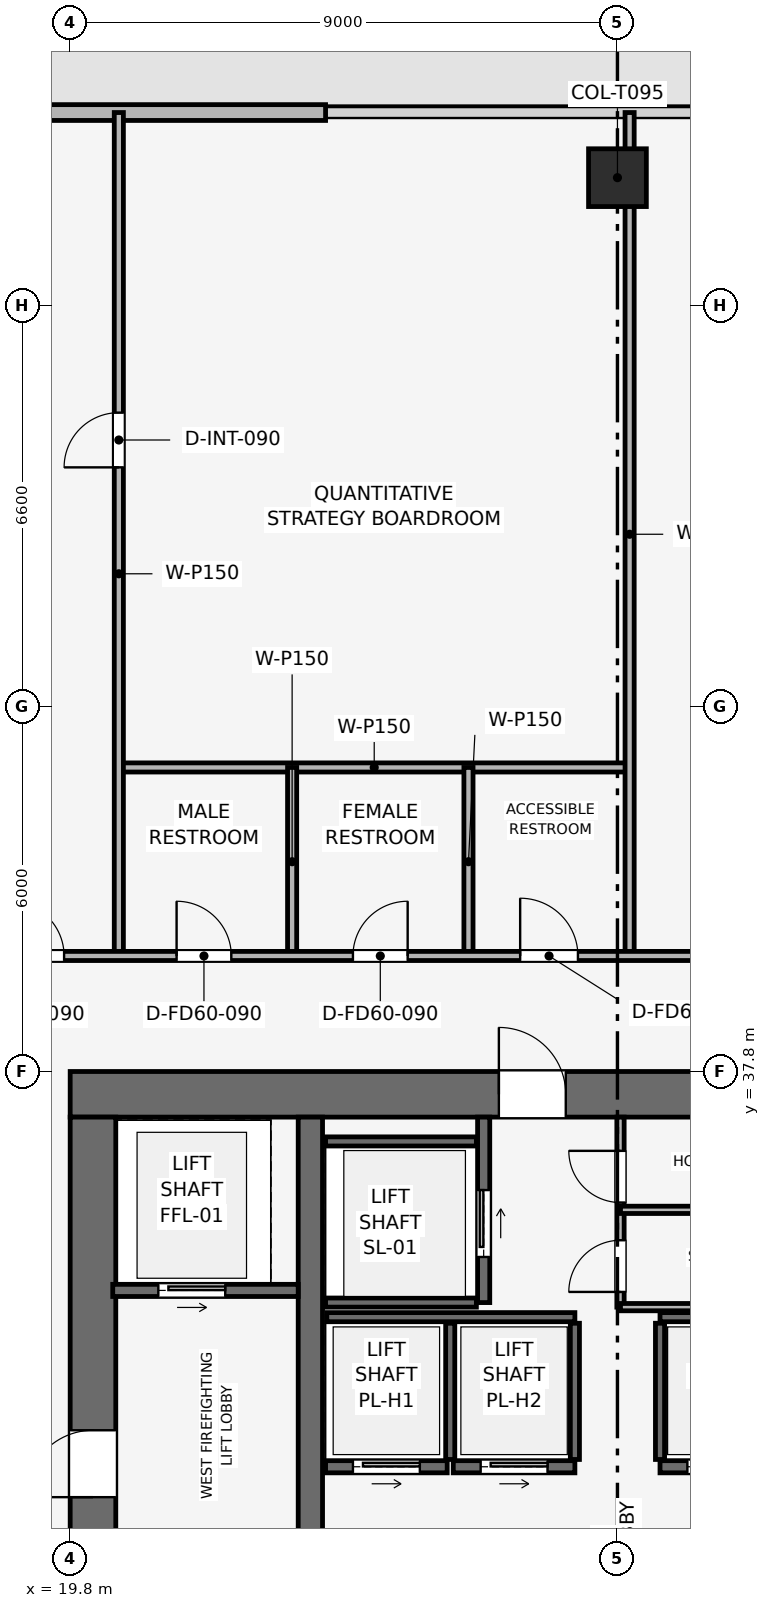
"""IFC4 building model, lengths in metres.
Left out: names, types, materials, properties, quantities, classifications, styles, units other than length and angle.
Written with IfcOpenShell. Run it as: python <this file> out.ifc"""

import sys

from ifc_helpers import new_model, si_unit, direction, frame, frame_2d, origin, origin_2d, place, context, subcontext, project, spatial, rectangle, extrude, element, fill, save


model = new_model("IFC4")
c1 = context("Model", 3, precision=1e-05, world=origin(), true_north=direction((0.0, 1.0)))
c2 = subcontext(c1, "Body", "Model", "MODEL_VIEW")
j1 = project(units=[si_unit("LENGTHUNIT", "METRE"), si_unit("PLANEANGLEUNIT", "RADIAN")], contexts=[c1])
p1 = place(None, origin())
s1 = spatial("IfcSite", under=j1, at=p1, CompositionType="ELEMENT")
p2 = place(p1, origin())
s2 = spatial("IfcBuilding", under=s1, at=p2, CompositionType="ELEMENT")
p3 = place(p2, frame((0.0, 0.0, 280.35)))
s3 = spatial("IfcBuildingStorey", under=s2, at=p3, CompositionType="ELEMENT", Elevation=280.35)
p4 = place(p3, frame((19.8, 37.425, 0.0), z_axis=(0.0, 0.0, 1.0), x_axis=(1.0, 0.0, 0.0)))
e1 = element("IfcWall", 1, at=p4, inside=s3, PredefinedType="SHEAR", context=c2, shape_type="SweptSolid", body=[
    extrude(rectangle(XDim=18.0, YDim=0.75, at=frame_2d((9.0, 0.0))), origin(), (0.0, 0.0, 1.0), 3.75),
])
p5 = place(p4, frame((7.05, 0.0, 0.0)))
e2 = element("IfcOpeningElement", 2, at=p5, cuts=e1, PredefinedType="OPENING", context=c2, shape_type="SweptSolid", body=[
    extrude(rectangle(XDim=1.1, YDim=2.15, at=frame_2d((0.55, 1.075))), frame((0.0, 0.385, 0.0), z_axis=(0.0, -1.0, 0.0), x_axis=(1.0, 0.0, 0.0)), (0.0, 0.0, 1.0), 0.77),
])
p6 = place(p3, frame((20.175, 20.55, 0.0), z_axis=(0.0, 0.0, 1.0), x_axis=(0.0, 1.0, 0.0)))
e3 = element("IfcWall", 3, at=p6, inside=s3, PredefinedType="SHEAR", context=c2, shape_type="SweptSolid", body=[
    extrude(rectangle(XDim=16.5, YDim=0.75, at=frame_2d((8.25, 0.0))), origin(), (0.0, 0.0, 1.0), 3.75),
])
p7 = place(p6, frame((10.25, 0.0, 0.0)))
e4 = element("IfcOpeningElement", 4, at=p7, cuts=e3, PredefinedType="OPENING", context=c2, shape_type="SweptSolid", body=[
    extrude(rectangle(XDim=1.1, YDim=2.15, at=frame_2d((0.55, 1.075))), frame((0.0, 0.385, 0.0), z_axis=(0.0, -1.0, 0.0), x_axis=(1.0, 0.0, 0.0)), (0.0, 0.0, 1.0), 0.77),
])
p8 = place(p3, frame((23.75, 20.55, 0.0), z_axis=(0.0, 0.0, 1.0), x_axis=(0.0, 1.0, 0.0)))
e5 = element("IfcWall", 5, at=p8, inside=s3, PredefinedType="SHEAR", context=c2, shape_type="SweptSolid", body=[
    extrude(rectangle(XDim=16.5, YDim=0.4, at=frame_2d((8.25, 0.0))), origin(), (0.0, 0.0, 1.0), 3.75),
])
p9 = place(p3, frame((28.8, 52.499, 0.003), z_axis=(0.0, -0.23333049931, 0.97239748976), x_axis=(1.0, 0.0, 0.0)))
e6 = element("IfcColumn", 6, at=p9, inside=s3, PredefinedType="COLUMN", context=c2, shape_type="SweptSolid", body=[
    extrude(rectangle(XDim=0.95, YDim=0.95, at=origin_2d()), origin(), (0.0, 0.0, 1.0), 3.48),
])
p10 = place(p3, frame((10.8, 53.57, 0.0), z_axis=(0.0, 0.0, 1.0), x_axis=(1.0, 0.0, 0.0)))
e7 = element("IfcWall", 7, at=p10, inside=s3, PredefinedType="SOLIDWALL", context=c2, shape_type="SweptSolid", body=[
    extrude(rectangle(XDim=13.2, YDim=0.26, at=frame_2d((6.6, 0.0))), origin(), (0.0, 0.0, 1.0), 3.39),
])
p11 = place(p10, frame((6.516, 0.0, 0.0)))
e8 = element("IfcOpeningElement", 8, at=p11, cuts=e7, PredefinedType="OPENING", context=c2, shape_type="SweptSolid", body=[
    extrude(rectangle(XDim=1.0, YDim=2.2, at=frame_2d((0.5, 1.1))), frame((0.0, 0.14, 0.0), z_axis=(0.0, -1.0, 0.0), x_axis=(1.0, 0.0, 0.0)), (0.0, 0.0, 1.0), 0.28),
])
p12 = place(p3, frame((20.5, 34.2, 0.0), z_axis=(0.0, 0.0, 1.0), x_axis=(1.0, 0.0, 0.0)))
e9 = element("IfcWall", 9, at=p12, inside=s3, PredefinedType="SHEAR", context=c2, shape_type="SweptSolid", body=[
    extrude(rectangle(XDim=3.05, YDim=0.2, at=frame_2d((1.525, 0.0))), origin(), (0.0, 0.0, 1.0), 3.39),
])
p13 = place(p12, frame((0.75, 0.0, 0.0)))
e10 = element("IfcOpeningElement", 10, at=p13, cuts=e9, PredefinedType="OPENING", context=c2, shape_type="SweptSolid", body=[
    extrude(rectangle(XDim=1.1, YDim=2.15, at=frame_2d((0.55, 1.075))), frame((0.0, 0.11, 0.0), z_axis=(0.0, -1.0, 0.0), x_axis=(1.0, 0.0, 0.0)), (0.0, 0.0, 1.0), 0.22),
])
p14 = place(p3, frame((26.6, 34.0, 0.0), z_axis=(0.0, 0.0, 1.0), x_axis=(0.0, 1.0, 0.0)))
e11 = element("IfcWall", 11, at=p14, inside=s3, PredefinedType="SHEAR", context=c2, shape_type="SweptSolid", body=[
    extrude(rectangle(XDim=3.05, YDim=0.2, at=frame_2d((1.525, 0.0))), origin(), (0.0, 0.0, 1.0), 3.39),
])
p15 = place(p14, frame((0.75, 0.0, 0.0)))
e12 = element("IfcOpeningElement", 12, at=p15, cuts=e11, PredefinedType="OPENING", context=c2, shape_type="SweptSolid", body=[
    extrude(rectangle(XDim=1.1, YDim=2.15, at=frame_2d((0.55, 1.075))), frame((0.0, 0.11, 0.0), z_axis=(0.0, -1.0, 0.0), x_axis=(1.0, 0.0, 0.0)), (0.0, 0.0, 1.0), 0.22),
])
for number, where, z_axis, x_axis in (
    (13, (24.0, 34.0, 0.0), (0.0, 0.0, 1.0), (1.0, 0.0, 0.0)),
    (14, (24.0, 36.65, 0.0), (0.0, 0.0, 1.0), (1.0, 0.0, 0.0)),
):
    element("IfcWall", number, at=place(p3, frame(where, z_axis=z_axis, x_axis=x_axis)), inside=s3, PredefinedType="SHEAR", context=c2, shape_type="SweptSolid", body=[
        extrude(rectangle(XDim=2.48, YDim=0.15, at=frame_2d((1.24, 0.0))), origin(), (0.0, 0.0, 1.0), 3.39),
    ])
p16 = place(p3, frame((24.0, 31.3, 0.0), z_axis=(0.0, 0.0, 1.0), x_axis=(1.0, 0.0, 0.0)))
e15 = element("IfcWall", 15, at=p16, inside=s3, PredefinedType="SHEAR", context=c2, shape_type="SweptSolid", body=[
    extrude(rectangle(XDim=2.0, YDim=0.2, at=frame_2d((1.0, 0.0))), origin(), (0.0, 0.0, 1.0), 3.39),
])
p17 = place(p16, frame((0.45, 0.0, 0.0)))
e16 = element("IfcOpeningElement", 16, at=p17, cuts=e15, PredefinedType="OPENING", context=c2, shape_type="SweptSolid", body=[
    extrude(rectangle(XDim=1.1, YDim=2.15, at=frame_2d((0.55, 1.075))), frame((0.0, 0.11, 0.0), z_axis=(0.0, -1.0, 0.0), x_axis=(1.0, 0.0, 0.0)), (0.0, 0.0, 1.0), 0.22),
])
p18 = place(p3, frame((26.1, 31.3, 0.0), z_axis=(0.0, 0.0, 1.0), x_axis=(1.0, 0.0, 0.0)))
e17 = element("IfcWall", 17, at=p18, inside=s3, PredefinedType="SHEAR", context=c2, shape_type="SweptSolid", body=[
    extrude(rectangle(XDim=2.0, YDim=0.2, at=frame_2d((1.0, 0.0))), origin(), (0.0, 0.0, 1.0), 3.39),
])
p19 = place(p18, frame((0.45, 0.0, 0.0)))
e18 = element("IfcOpeningElement", 18, at=p19, cuts=e17, PredefinedType="OPENING", context=c2, shape_type="SweptSolid", body=[
    extrude(rectangle(XDim=1.1, YDim=2.15, at=frame_2d((0.55, 1.075))), frame((0.0, 0.11, 0.0), z_axis=(0.0, -1.0, 0.0), x_axis=(1.0, 0.0, 0.0)), (0.0, 0.0, 1.0), 0.22),
])
p20 = place(p3, frame((29.5, 31.3, 0.0), z_axis=(0.0, 0.0, 1.0), x_axis=(1.0, 0.0, 0.0)))
e19 = element("IfcWall", 19, at=p20, inside=s3, PredefinedType="SHEAR", context=c2, shape_type="SweptSolid", body=[
    extrude(rectangle(XDim=2.0, YDim=0.2, at=frame_2d((1.0, 0.0))), origin(), (0.0, 0.0, 1.0), 3.39),
])
p21 = place(p20, frame((0.45, 0.0, 0.0)))
e20 = element("IfcOpeningElement", 20, at=p21, cuts=e19, PredefinedType="OPENING", context=c2, shape_type="SweptSolid", body=[
    extrude(rectangle(XDim=1.1, YDim=2.15, at=frame_2d((0.55, 1.075))), frame((0.0, 0.11, 0.0), z_axis=(0.0, -1.0, 0.0), x_axis=(1.0, 0.0, 0.0)), (0.0, 0.0, 1.0), 0.22),
])
for number, where, z_axis, x_axis in (
    (21, (24.02, 33.76, 0.0), (0.0, 0.0, 1.0), (1.0, 0.0, 0.0)),
    (22, (29.5, 33.76, 0.0), (0.0, 0.0, 1.0), (1.0, 0.0, 0.0)),
):
    element("IfcWall", number, at=place(p3, frame(where, z_axis=z_axis, x_axis=x_axis)), inside=s3, PredefinedType="SHEAR", context=c2, shape_type="SweptSolid", body=[
        extrude(rectangle(XDim=4.08, YDim=0.15, at=frame_2d((2.04, 0.0))), origin(), (0.0, 0.0, 1.0), 3.39),
    ])
for number, where, z_axis, x_axis in (
    (23, (26.05, 31.42, 0.0), (0.0, 0.0, 1.0), (0.0, 1.0, 0.0)),
    (24, (28.1, 31.42, 0.0), (0.0, 0.0, 1.0), (0.0, 1.0, 0.0)),
    (25, (29.5, 31.42, 0.0), (0.0, 0.0, 1.0), (0.0, 1.0, 0.0)),
):
    element("IfcWall", number, at=place(p3, frame(where, z_axis=z_axis, x_axis=x_axis)), inside=s3, PredefinedType="SHEAR", context=c2, shape_type="SweptSolid", body=[
        extrude(rectangle(XDim=2.24, YDim=0.15, at=frame_2d((1.12, 0.0))), origin(), (0.0, 0.0, 1.0), 3.39),
    ])
p22 = place(p3, frame((28.85, 33.925, 0.0), z_axis=(0.0, 0.0, 1.0), x_axis=(0.0, 1.0, 0.0)))
e26 = element("IfcWall", 26, at=p22, inside=s3, PredefinedType="PARTITIONING", context=c2, shape_type="SweptSolid", body=[
    extrude(rectangle(XDim=3.125, YDim=0.12, at=frame_2d((1.562, 0.0))), origin(), (0.0, 0.0, 1.0), 3.39),
])
p23 = place(p22, frame((0.25, 0.0, 0.0)))
e27 = element("IfcOpeningElement", 27, at=p23, cuts=e26, PredefinedType="OPENING", context=c2, shape_type="SweptSolid", body=[
    extrude(rectangle(XDim=0.85, YDim=2.1, at=frame_2d((0.425, 1.05))), frame((0.0, 0.07, 0.0), z_axis=(0.0, -1.0, 0.0), x_axis=(1.0, 0.0, 0.0)), (0.0, 0.0, 1.0), 0.14),
])
p24 = place(p22, frame((1.72, 0.0, 0.0)))
e28 = element("IfcOpeningElement", 28, at=p24, cuts=e26, PredefinedType="OPENING", context=c2, shape_type="SweptSolid", body=[
    extrude(rectangle(XDim=0.85, YDim=2.1, at=frame_2d((0.425, 1.05))), frame((0.0, 0.07, 0.0), z_axis=(0.0, -1.0, 0.0), x_axis=(1.0, 0.0, 0.0)), (0.0, 0.0, 1.0), 0.14),
])
for number, where, z_axis, x_axis in (
    (29, (28.85, 35.525, 0.0), (0.0, 0.0, 1.0), (1.0, 0.0, 0.0)),
    (30, (28.85, 33.925, 0.0), (0.0, 0.0, 1.0), (1.0, 0.0, 0.0)),
):
    element("IfcWall", number, at=place(p3, frame(where, z_axis=z_axis, x_axis=x_axis)), inside=s3, PredefinedType="PARTITIONING", context=c2, shape_type="SweptSolid", body=[
        extrude(rectangle(XDim=3.3, YDim=0.12, at=frame_2d((1.65, 0.0))), origin(), (0.0, 0.0, 1.0), 3.39),
    ])
p25 = place(p3, frame((20.6, 42.8, 0.0), z_axis=(0.0, 0.0, 1.0), x_axis=(1.0, 0.0, 0.0)))
e31 = element("IfcWall", 31, at=p25, inside=s3, PredefinedType="PARTITIONING", context=c2, shape_type="SweptSolid", body=[
    extrude(rectangle(XDim=8.4, YDim=0.15, at=frame_2d((4.2, 0.0))), origin(), (0.0, 0.0, 1.0), 2.975),
])
p26 = place(p3, frame((20.6, 39.7, 0.0), z_axis=(0.0, 0.0, 1.0), x_axis=(0.0, 1.0, 0.0)))
e32 = element("IfcWall", 32, at=p26, inside=s3, PredefinedType="PARTITIONING", context=c2, shape_type="SweptSolid", body=[
    extrude(rectangle(XDim=13.87, YDim=0.15, at=frame_2d((6.935, 0.0))), origin(), (0.0, 0.0, 1.0), 2.975),
])
p27 = place(p26, frame((8.035, 0.0, 0.0)))
e33 = element("IfcOpeningElement", 33, at=p27, cuts=e32, PredefinedType="OPENING", context=c2, shape_type="SweptSolid", body=[
    extrude(rectangle(XDim=0.9, YDim=2.1, at=frame_2d((0.45, 1.05))), frame((0.0, 0.085, 0.0), z_axis=(0.0, -1.0, 0.0), x_axis=(1.0, 0.0, 0.0)), (0.0, 0.0, 1.0), 0.17),
])
p28 = place(p3, frame((29.0, 39.7, 0.0), z_axis=(0.0, 0.0, 1.0), x_axis=(0.0, 1.0, 0.0)))
e34 = element("IfcWall", 34, at=p28, inside=s3, PredefinedType="PARTITIONING", context=c2, shape_type="SweptSolid", body=[
    extrude(rectangle(XDim=13.87, YDim=0.15, at=frame_2d((6.935, 0.0))), origin(), (0.0, 0.0, 1.0), 2.975),
])
for number, where, z_axis, x_axis in (
    (35, (23.45, 39.7, 0.0), (0.0, 0.0, 1.0), (0.0, 1.0, 0.0)),
    (36, (26.35, 39.7, 0.0), (0.0, 0.0, 1.0), (0.0, 1.0, 0.0)),
):
    element("IfcWall", number, at=place(p3, frame(where, z_axis=z_axis, x_axis=x_axis)), inside=s3, PredefinedType="PARTITIONING", context=c2, shape_type="SweptSolid", body=[
        extrude(rectangle(XDim=3.1, YDim=0.15, at=frame_2d((1.55, 0.0))), origin(), (0.0, 0.0, 1.0), 3.015),
    ])
p29 = place(p3, frame((17.9, 39.7, 0.0), z_axis=(0.0, 0.0, 1.0), x_axis=(1.0, 0.0, 0.0)))
e37 = element("IfcWall", 37, at=p29, inside=s3, PredefinedType="PARTITIONING", context=c2, shape_type="SweptSolid", body=[
    extrude(rectangle(XDim=21.8, YDim=0.15, at=frame_2d((10.9, 0.0))), origin(), (0.0, 0.0, 1.0), 2.975),
])
p30 = place(p29, frame((0.9, 0.0, 0.0)))
e38 = element("IfcOpeningElement", 38, at=p30, cuts=e37, PredefinedType="OPENING", context=c2, shape_type="SweptSolid", body=[
    extrude(rectangle(XDim=0.9, YDim=2.1, at=frame_2d((0.45, 1.05))), frame((0.0, 0.085, 0.0), z_axis=(0.0, -1.0, 0.0), x_axis=(1.0, 0.0, 0.0)), (0.0, 0.0, 1.0), 0.17),
])
p31 = place(p29, frame((3.65, 0.0, 0.0)))
e39 = element("IfcOpeningElement", 39, at=p31, cuts=e37, PredefinedType="OPENING", context=c2, shape_type="SweptSolid", body=[
    extrude(rectangle(XDim=0.9, YDim=2.1, at=frame_2d((0.45, 1.05))), frame((0.0, 0.085, 0.0), z_axis=(0.0, -1.0, 0.0), x_axis=(1.0, 0.0, 0.0)), (0.0, 0.0, 1.0), 0.17),
])
p32 = place(p29, frame((6.55, 0.0, 0.0)))
e40 = element("IfcOpeningElement", 40, at=p32, cuts=e37, PredefinedType="OPENING", context=c2, shape_type="SweptSolid", body=[
    extrude(rectangle(XDim=0.9, YDim=2.1, at=frame_2d((0.45, 1.05))), frame((0.0, 0.085, 0.0), z_axis=(0.0, -1.0, 0.0), x_axis=(1.0, 0.0, 0.0)), (0.0, 0.0, 1.0), 0.17),
])
p33 = place(p29, frame((9.3, 0.0, 0.0)))
e41 = element("IfcOpeningElement", 41, at=p33, cuts=e37, PredefinedType="OPENING", context=c2, shape_type="SweptSolid", body=[
    extrude(rectangle(XDim=0.95, YDim=2.1, at=frame_2d((0.475, 1.05))), frame((0.0, 0.085, 0.0), z_axis=(0.0, -1.0, 0.0), x_axis=(1.0, 0.0, 0.0)), (0.0, 0.0, 1.0), 0.17),
])
p34 = place(p29, frame((16.0, 0.0, 0.0)))
e42 = element("IfcOpeningElement", 42, at=p34, cuts=e37, PredefinedType="OPENING", context=c2, shape_type="SweptSolid", body=[
    extrude(rectangle(XDim=0.9, YDim=2.1, at=frame_2d((0.45, 1.05))), frame((0.0, 0.085, 0.0), z_axis=(0.0, -1.0, 0.0), x_axis=(1.0, 0.0, 0.0)), (0.0, 0.0, 1.0), 0.17),
])
p35 = place(p13, origin())
e43 = element("IfcDoor", 43, at=p35, inside=s3, OperationType="SLIDING_TO_RIGHT", PredefinedType="DOOR", context=c2, shape_type="SweptSolid", body=[
    extrude(rectangle(XDim=1.1, YDim=2.15, at=frame_2d((0.55, 1.075))), frame((0.0, 0.025, 0.0), z_axis=(0.0, -1.0, 0.0), x_axis=(1.0, 0.0, 0.0)), (0.0, 0.0, 1.0), 0.05),
])
fill(e10, e43)
p36 = place(p15, origin())
e44 = element("IfcDoor", 44, at=p36, inside=s3, OperationType="SLIDING_TO_RIGHT", PredefinedType="DOOR", context=c2, shape_type="SweptSolid", body=[
    extrude(rectangle(XDim=1.1, YDim=2.15, at=frame_2d((0.55, 1.075))), frame((0.0, 0.025, 0.0), z_axis=(0.0, -1.0, 0.0), x_axis=(1.0, 0.0, 0.0)), (0.0, 0.0, 1.0), 0.05),
])
fill(e12, e44)
p37 = place(p17, origin())
e45 = element("IfcDoor", 45, at=p37, inside=s3, OperationType="SLIDING_TO_RIGHT", PredefinedType="DOOR", context=c2, shape_type="SweptSolid", body=[
    extrude(rectangle(XDim=1.1, YDim=2.15, at=frame_2d((0.55, 1.075))), frame((0.0, 0.025, 0.0), z_axis=(0.0, -1.0, 0.0), x_axis=(1.0, 0.0, 0.0)), (0.0, 0.0, 1.0), 0.05),
])
fill(e16, e45)
p38 = place(p19, origin())
e46 = element("IfcDoor", 46, at=p38, inside=s3, OperationType="SLIDING_TO_RIGHT", PredefinedType="DOOR", context=c2, shape_type="SweptSolid", body=[
    extrude(rectangle(XDim=1.1, YDim=2.15, at=frame_2d((0.55, 1.075))), frame((0.0, 0.025, 0.0), z_axis=(0.0, -1.0, 0.0), x_axis=(1.0, 0.0, 0.0)), (0.0, 0.0, 1.0), 0.05),
])
fill(e18, e46)
p39 = place(p21, origin())
e47 = element("IfcDoor", 47, at=p39, inside=s3, OperationType="SLIDING_TO_RIGHT", PredefinedType="DOOR", context=c2, shape_type="SweptSolid", body=[
    extrude(rectangle(XDim=1.1, YDim=2.15, at=frame_2d((0.55, 1.075))), frame((0.0, 0.025, 0.0), z_axis=(0.0, -1.0, 0.0), x_axis=(1.0, 0.0, 0.0)), (0.0, 0.0, 1.0), 0.05),
])
fill(e20, e47)
p40 = place(p23, origin())
e48 = element("IfcDoor", 48, at=p40, inside=s3, OperationType="SINGLE_SWING_LEFT", PredefinedType="DOOR", context=c2, shape_type="SweptSolid", body=[
    extrude(rectangle(XDim=0.85, YDim=2.1, at=frame_2d((0.425, 1.05))), frame((0.0, 0.025, 0.0), z_axis=(0.0, -1.0, 0.0), x_axis=(1.0, 0.0, 0.0)), (0.0, 0.0, 1.0), 0.05),
])
fill(e27, e48)
p41 = place(p24, origin())
e49 = element("IfcDoor", 49, at=p41, inside=s3, OperationType="SINGLE_SWING_RIGHT", PredefinedType="DOOR", context=c2, shape_type="SweptSolid", body=[
    extrude(rectangle(XDim=0.85, YDim=2.1, at=frame_2d((0.425, 1.05))), frame((0.0, 0.025, 0.0), z_axis=(0.0, -1.0, 0.0), x_axis=(1.0, 0.0, 0.0)), (0.0, 0.0, 1.0), 0.05),
])
fill(e28, e49)
p42 = place(p27, origin())
e50 = element("IfcDoor", 50, at=p42, inside=s3, OperationType="SINGLE_SWING_LEFT", PredefinedType="DOOR", context=c2, shape_type="SweptSolid", body=[
    extrude(rectangle(XDim=0.9, YDim=2.1, at=frame_2d((0.45, 1.05))), frame((0.0, 0.025, 0.0), z_axis=(0.0, -1.0, 0.0), x_axis=(1.0, 0.0, 0.0)), (0.0, 0.0, 1.0), 0.05),
])
fill(e33, e50)
p43 = place(p30, origin())
e51 = element("IfcDoor", 51, at=p43, inside=s3, OperationType="SINGLE_SWING_LEFT", PredefinedType="DOOR", context=c2, shape_type="SweptSolid", body=[
    extrude(rectangle(XDim=0.9, YDim=2.1, at=frame_2d((0.45, 1.05))), frame((0.0, 0.025, 0.0), z_axis=(0.0, -1.0, 0.0), x_axis=(1.0, 0.0, 0.0)), (0.0, 0.0, 1.0), 0.05),
])
fill(e38, e51)
p44 = place(p31, origin())
e52 = element("IfcDoor", 52, at=p44, inside=s3, OperationType="SINGLE_SWING_LEFT", PredefinedType="DOOR", context=c2, shape_type="SweptSolid", body=[
    extrude(rectangle(XDim=0.9, YDim=2.1, at=frame_2d((0.45, 1.05))), frame((0.0, 0.025, 0.0), z_axis=(0.0, -1.0, 0.0), x_axis=(1.0, 0.0, 0.0)), (0.0, 0.0, 1.0), 0.05),
])
fill(e39, e52)
p45 = place(p32, origin())
e53 = element("IfcDoor", 53, at=p45, inside=s3, OperationType="SINGLE_SWING_RIGHT", PredefinedType="DOOR", context=c2, shape_type="SweptSolid", body=[
    extrude(rectangle(XDim=0.9, YDim=2.1, at=frame_2d((0.45, 1.05))), frame((0.0, 0.025, 0.0), z_axis=(0.0, -1.0, 0.0), x_axis=(1.0, 0.0, 0.0)), (0.0, 0.0, 1.0), 0.05),
])
fill(e40, e53)
p46 = place(p33, origin())
e54 = element("IfcDoor", 54, at=p46, inside=s3, OperationType="SINGLE_SWING_LEFT", PredefinedType="DOOR", context=c2, shape_type="SweptSolid", body=[
    extrude(rectangle(XDim=0.95, YDim=2.1, at=frame_2d((0.475, 1.05))), frame((0.0, 0.025, 0.0), z_axis=(0.0, -1.0, 0.0), x_axis=(1.0, 0.0, 0.0)), (0.0, 0.0, 1.0), 0.05),
])
fill(e41, e54)
p47 = place(p7, origin())
e55 = element("IfcDoor", 55, at=p47, inside=s3, OperationType="SINGLE_SWING_LEFT", PredefinedType="DOOR", context=c2, shape_type="SweptSolid", body=[
    extrude(rectangle(XDim=1.1, YDim=2.15, at=frame_2d((0.55, 1.075))), frame((0.0, 0.025, 0.0), z_axis=(0.0, -1.0, 0.0), x_axis=(1.0, 0.0, 0.0)), (0.0, 0.0, 1.0), 0.05),
])
fill(e4, e55)
p48 = place(p5, origin())
e56 = element("IfcDoor", 56, at=p48, inside=s3, OperationType="SINGLE_SWING_LEFT", PredefinedType="DOOR", context=c2, shape_type="SweptSolid", body=[
    extrude(rectangle(XDim=1.1, YDim=2.15, at=frame_2d((0.55, 1.075))), frame((0.0, 0.025, 0.0), z_axis=(0.0, -1.0, 0.0), x_axis=(1.0, 0.0, 0.0)), (0.0, 0.0, 1.0), 0.05),
])
fill(e2, e56)
save(model, sys.argv[1])
